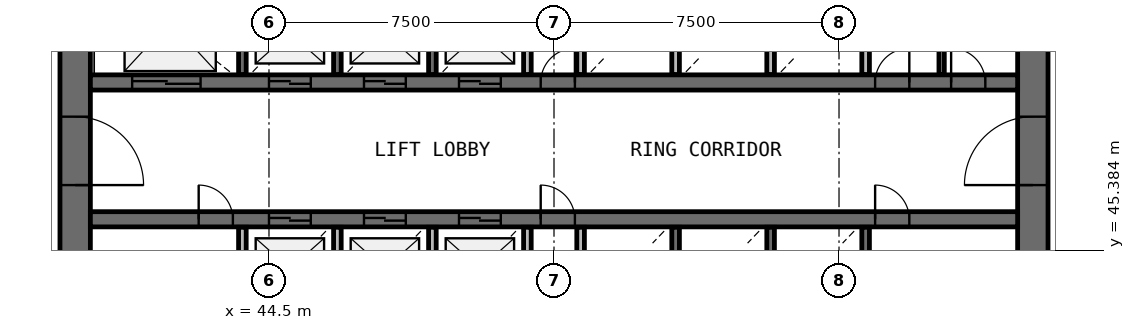
"""IFC4 building model, lengths in metres.
Left out: names, types, materials, properties, quantities, classifications, styles, units other than length and angle.
Written with IfcOpenShell. Run it as: python <this file> out.ifc"""

import sys

from ifc_helpers import new_model, si_unit, direction, frame, frame_2d, origin, place, context, subcontext, project, spatial, rectangle, extrude, source, transform, mapped, element, fill, save


model = new_model("IFC4")
c1 = context("Model", 3, precision=1e-05, world=origin(), true_north=direction((0.0, 1.0)))
c2 = subcontext(c1, "Body", "Model", "MODEL_VIEW")
j1 = project(units=[si_unit("LENGTHUNIT", "METRE"), si_unit("PLANEANGLEUNIT", "RADIAN")], contexts=[c1])
p1 = place(None, origin())
s1 = spatial("IfcSite", under=j1, at=p1, CompositionType="ELEMENT")
p2 = place(p1, origin())
s2 = spatial("IfcBuilding", under=s1, at=p2, CompositionType="ELEMENT")
p3 = place(p2, frame((0.0, 0.0, 92.1)))
s3 = spatial("IfcBuildingStorey", under=s2, at=p3, CompositionType="ELEMENT", Elevation=92.1)
p4 = place(p3, frame((64.6, 38.0, 0.0), z_axis=(0.0, 0.0, 1.0), x_axis=(0.0, 1.0, 0.0)))
e1 = element("IfcWall", 1, at=p4, inside=s3, PredefinedType="SHEAR", context=c2, shape_type="SweptSolid", body=[
    extrude(rectangle(XDim=20.0, YDim=0.8, at=frame_2d((10.0, 0.0))), origin(), (0.0, 0.0, 1.0), 4.1),
])
p5 = place(p4, frame((9.1, 0.0, 0.0)))
e2 = element("IfcOpeningElement", 2, at=p5, cuts=e1, PredefinedType="OPENING", context=c2, shape_type="SweptSolid", body=[
    extrude(rectangle(XDim=1.8, YDim=2.1, at=frame_2d((0.9, 1.05))), frame((0.0, 0.41, 0.0), z_axis=(0.0, -1.0, 0.0), x_axis=(1.0, 0.0, 0.0)), (0.0, 0.0, 1.0), 0.82),
])
p6 = place(p3, frame((39.4, 58.0, 0.0), z_axis=(0.0, 0.0, 1.0), x_axis=(0.0, -1.0, 0.0)))
e3 = element("IfcWall", 3, at=p6, inside=s3, PredefinedType="SHEAR", context=c2, shape_type="SweptSolid", body=[
    extrude(rectangle(XDim=20.0, YDim=0.8, at=frame_2d((10.0, 0.0))), origin(), (0.0, 0.0, 1.0), 4.1),
])
p7 = place(p6, frame((9.1, 0.0, 0.0)))
e4 = element("IfcOpeningElement", 4, at=p7, cuts=e3, PredefinedType="OPENING", context=c2, shape_type="SweptSolid", body=[
    extrude(rectangle(XDim=1.8, YDim=2.1, at=frame_2d((0.9, 1.05))), frame((0.0, 0.41, 0.0), z_axis=(0.0, -1.0, 0.0), x_axis=(1.0, 0.0, 0.0)), (0.0, 0.0, 1.0), 0.82),
])
p8 = place(p3, frame((39.8, 49.8, 0.0), z_axis=(0.0, 0.0, 1.0), x_axis=(1.0, 0.0, 0.0)))
e5 = element("IfcWall", 5, at=p8, inside=s3, PredefinedType="SHEAR", context=c2, shape_type="SweptSolid", body=[
    extrude(rectangle(XDim=24.4, YDim=0.4, at=frame_2d((12.2, 0.0))), origin(), (0.0, 0.0, 1.0), 4.1),
])
p9 = place(p8, frame((4.7, 0.0, 0.0)))
e6 = element("IfcOpeningElement", 6, at=p9, cuts=e5, PredefinedType="OPENING", context=c2, shape_type="SweptSolid", body=[
    extrude(rectangle(XDim=1.1, YDim=2.1, at=frame_2d((0.55, 1.05))), frame((0.0, 0.21, 0.0), z_axis=(0.0, -1.0, 0.0), x_axis=(1.0, 0.0, 0.0)), (0.0, 0.0, 1.0), 0.42),
])
p10 = place(p8, frame((7.2, 0.0, 0.0)))
e7 = element("IfcOpeningElement", 7, at=p10, cuts=e5, PredefinedType="OPENING", context=c2, shape_type="SweptSolid", body=[
    extrude(rectangle(XDim=1.1, YDim=2.1, at=frame_2d((0.55, 1.05))), frame((0.0, 0.21, 0.0), z_axis=(0.0, -1.0, 0.0), x_axis=(1.0, 0.0, 0.0)), (0.0, 0.0, 1.0), 0.42),
])
p11 = place(p8, frame((9.7, 0.0, 0.0)))
e8 = element("IfcOpeningElement", 8, at=p11, cuts=e5, PredefinedType="OPENING", context=c2, shape_type="SweptSolid", body=[
    extrude(rectangle(XDim=1.1, YDim=2.1, at=frame_2d((0.55, 1.05))), frame((0.0, 0.21, 0.0), z_axis=(0.0, -1.0, 0.0), x_axis=(1.0, 0.0, 0.0)), (0.0, 0.0, 1.0), 0.42),
])
p12 = place(p8, frame((1.1, 0.0, 0.0)))
e9 = element("IfcOpeningElement", 9, at=p12, cuts=e5, PredefinedType="OPENING", context=c2, shape_type="SweptSolid", body=[
    extrude(rectangle(XDim=1.8, YDim=2.4, at=frame_2d((0.9, 1.2))), frame((0.0, 0.21, 0.0), z_axis=(0.0, -1.0, 0.0), x_axis=(1.0, 0.0, 0.0)), (0.0, 0.0, 1.0), 0.42),
])
p13 = place(p8, frame((20.65, 0.0, 0.0)))
e10 = element("IfcOpeningElement", 10, at=p13, cuts=e5, PredefinedType="OPENING", context=c2, shape_type="SweptSolid", body=[
    extrude(rectangle(XDim=0.9, YDim=2.1, at=frame_2d((0.45, 1.05))), frame((0.0, 0.21, 0.0), z_axis=(0.0, -1.0, 0.0), x_axis=(1.0, 0.0, 0.0)), (0.0, 0.0, 1.0), 0.42),
])
p14 = place(p8, frame((22.65, 0.0, 0.0)))
e11 = element("IfcOpeningElement", 11, at=p14, cuts=e5, PredefinedType="OPENING", context=c2, shape_type="SweptSolid", body=[
    extrude(rectangle(XDim=0.9, YDim=2.1, at=frame_2d((0.45, 1.05))), frame((0.0, 0.21, 0.0), z_axis=(0.0, -1.0, 0.0), x_axis=(1.0, 0.0, 0.0)), (0.0, 0.0, 1.0), 0.42),
])
p15 = place(p8, frame((11.85, 0.0, 0.0)))
e12 = element("IfcOpeningElement", 12, at=p15, cuts=e5, PredefinedType="OPENING", context=c2, shape_type="SweptSolid", body=[
    extrude(rectangle(XDim=0.9, YDim=2.1, at=frame_2d((0.45, 1.05))), frame((0.0, 0.21, 0.0), z_axis=(0.0, -1.0, 0.0), x_axis=(1.0, 0.0, 0.0)), (0.0, 0.0, 1.0), 0.42),
])
p16 = place(p3, frame((39.8, 46.2, 0.0), z_axis=(0.0, 0.0, 1.0), x_axis=(1.0, 0.0, 0.0)))
e13 = element("IfcWall", 13, at=p16, inside=s3, PredefinedType="SHEAR", context=c2, shape_type="SweptSolid", body=[
    extrude(rectangle(XDim=24.4, YDim=0.4, at=frame_2d((12.2, 0.0))), origin(), (0.0, 0.0, 1.0), 4.1),
])
p17 = place(p16, frame((4.7, 0.0, 0.0)))
e14 = element("IfcOpeningElement", 14, at=p17, cuts=e13, PredefinedType="OPENING", context=c2, shape_type="SweptSolid", body=[
    extrude(rectangle(XDim=1.1, YDim=2.1, at=frame_2d((0.55, 1.05))), frame((0.0, 0.21, 0.0), z_axis=(0.0, -1.0, 0.0), x_axis=(1.0, 0.0, 0.0)), (0.0, 0.0, 1.0), 0.42),
])
p18 = place(p16, frame((7.2, 0.0, 0.0)))
e15 = element("IfcOpeningElement", 15, at=p18, cuts=e13, PredefinedType="OPENING", context=c2, shape_type="SweptSolid", body=[
    extrude(rectangle(XDim=1.1, YDim=2.1, at=frame_2d((0.55, 1.05))), frame((0.0, 0.21, 0.0), z_axis=(0.0, -1.0, 0.0), x_axis=(1.0, 0.0, 0.0)), (0.0, 0.0, 1.0), 0.42),
])
p19 = place(p16, frame((9.7, 0.0, 0.0)))
e16 = element("IfcOpeningElement", 16, at=p19, cuts=e13, PredefinedType="OPENING", context=c2, shape_type="SweptSolid", body=[
    extrude(rectangle(XDim=1.1, YDim=2.1, at=frame_2d((0.55, 1.05))), frame((0.0, 0.21, 0.0), z_axis=(0.0, -1.0, 0.0), x_axis=(1.0, 0.0, 0.0)), (0.0, 0.0, 1.0), 0.42),
])
p20 = place(p16, frame((20.65, 0.0, 0.0)))
e17 = element("IfcOpeningElement", 17, at=p20, cuts=e13, PredefinedType="OPENING", context=c2, shape_type="SweptSolid", body=[
    extrude(rectangle(XDim=0.9, YDim=2.1, at=frame_2d((0.45, 1.05))), frame((0.0, 0.21, 0.0), z_axis=(0.0, -1.0, 0.0), x_axis=(1.0, 0.0, 0.0)), (0.0, 0.0, 1.0), 0.42),
])
p21 = place(p16, frame((2.85, 0.0, 0.0)))
e18 = element("IfcOpeningElement", 18, at=p21, cuts=e13, PredefinedType="OPENING", context=c2, shape_type="SweptSolid", body=[
    extrude(rectangle(XDim=0.9, YDim=2.1, at=frame_2d((0.45, 1.05))), frame((0.0, 0.21, 0.0), z_axis=(0.0, -1.0, 0.0), x_axis=(1.0, 0.0, 0.0)), (0.0, 0.0, 1.0), 0.42),
])
p22 = place(p16, frame((11.85, 0.0, 0.0)))
e19 = element("IfcOpeningElement", 19, at=p22, cuts=e13, PredefinedType="OPENING", context=c2, shape_type="SweptSolid", body=[
    extrude(rectangle(XDim=0.9, YDim=2.1, at=frame_2d((0.45, 1.05))), frame((0.0, 0.21, 0.0), z_axis=(0.0, -1.0, 0.0), x_axis=(1.0, 0.0, 0.0)), (0.0, 0.0, 1.0), 0.42),
])
for number, where, z_axis, x_axis in (
    (20, (43.8, 45.99, 0.0), (0.0, 0.0, 1.0), (0.0, -1.0, 0.0)),
    (21, (43.8, 52.37, 0.0), (0.0, 0.0, 1.0), (0.0, -1.0, 0.0)),
):
    element("IfcWall", number, at=place(p3, frame(where, z_axis=z_axis, x_axis=x_axis)), inside=s3, PredefinedType="SOLIDWALL", context=c2, shape_type="SweptSolid", body=[
        extrude(rectangle(XDim=2.36, YDim=0.2, at=frame_2d((1.18, 0.0))), origin(), (0.0, 0.0, 1.0), 3.7),
    ])
p23 = place(p3, frame((46.3, 43.6, 0.0), z_axis=(0.0, 0.0, 1.0), x_axis=(0.0, 1.0, 0.0)))
e22 = element("IfcWall", 22, at=p23, inside=s3, PredefinedType="SOLIDWALL", context=c2, shape_type="SweptSolid", body=[
    extrude(rectangle(XDim=2.39, YDim=0.2, at=frame_2d((1.195, 0.0))), origin(), (0.0, 0.0, 1.0), 3.7),
])
for number, where, z_axis, x_axis in (
    (23, (46.3, 50.01, 0.0), (0.0, 0.0, 1.0), (0.0, 1.0, 0.0)),
    (24, (48.8, 43.63, 0.0), (0.0, 0.0, 1.0), (0.0, 1.0, 0.0)),
    (25, (48.8, 50.01, 0.0), (0.0, 0.0, 1.0), (0.0, 1.0, 0.0)),
    (26, (51.3, 43.63, 0.0), (0.0, 0.0, 1.0), (0.0, 1.0, 0.0)),
):
    element("IfcWall", number, at=place(p3, frame(where, z_axis=z_axis, x_axis=x_axis)), inside=s3, PredefinedType="SOLIDWALL", context=c2, shape_type="SweptSolid", body=[
        extrude(rectangle(XDim=2.36, YDim=0.2, at=frame_2d((1.18, 0.0))), origin(), (0.0, 0.0, 1.0), 3.7),
    ])
for number, where, z_axis, x_axis in (
    (27, (51.3, 50.01, 0.0), (0.0, 0.0, 1.0), (0.0, 1.0, 0.0)),
    (28, (52.7, 45.99, 0.0), (0.0, 0.0, 1.0), (0.0, -1.0, 0.0)),
):
    element("IfcWall", number, at=place(p3, frame(where, z_axis=z_axis, x_axis=x_axis)), inside=s3, PredefinedType="SOLIDWALL", context=c2, shape_type="SweptSolid", body=[
        extrude(rectangle(XDim=2.39, YDim=0.2, at=frame_2d((1.195, 0.0))), origin(), (0.0, 0.0, 1.0), 3.7),
    ])
for number, where, z_axis, x_axis in (
    (29, (52.7, 52.37, 0.0), (0.0, 0.0, 1.0), (0.0, -1.0, 0.0)),
    (30, (55.2, 43.63, 0.0), (0.0, 0.0, 1.0), (0.0, 1.0, 0.0)),
    (31, (55.2, 50.01, 0.0), (0.0, 0.0, 1.0), (0.0, 1.0, 0.0)),
    (32, (57.7, 43.63, 0.0), (0.0, 0.0, 1.0), (0.0, 1.0, 0.0)),
):
    element("IfcWall", number, at=place(p3, frame(where, z_axis=z_axis, x_axis=x_axis)), inside=s3, PredefinedType="SOLIDWALL", context=c2, shape_type="SweptSolid", body=[
        extrude(rectangle(XDim=2.36, YDim=0.2, at=frame_2d((1.18, 0.0))), origin(), (0.0, 0.0, 1.0), 3.7),
    ])
p24 = place(p3, frame((57.7, 50.01, 0.0), z_axis=(0.0, 0.0, 1.0), x_axis=(0.0, 1.0, 0.0)))
e33 = element("IfcWall", 33, at=p24, inside=s3, PredefinedType="SOLIDWALL", context=c2, shape_type="SweptSolid", body=[
    extrude(rectangle(XDim=2.39, YDim=0.2, at=frame_2d((1.195, 0.0))), origin(), (0.0, 0.0, 1.0), 3.7),
])
for number, where, z_axis, x_axis in (
    (34, (60.2, 43.63, 0.0), (0.0, 0.0, 1.0), (0.0, 1.0, 0.0)),
    (35, (60.2, 50.01, 0.0), (0.0, 0.0, 1.0), (0.0, 1.0, 0.0)),
):
    element("IfcWall", number, at=place(p3, frame(where, z_axis=z_axis, x_axis=x_axis)), inside=s3, PredefinedType="SOLIDWALL", context=c2, shape_type="SweptSolid", body=[
        extrude(rectangle(XDim=2.36, YDim=0.2, at=frame_2d((1.18, 0.0))), origin(), (0.0, 0.0, 1.0), 3.7),
    ])
p25 = place(p3, frame((62.2, 50.01, 0.0), z_axis=(0.0, 0.0, 1.0), x_axis=(0.0, 1.0, 0.0)))
e36 = element("IfcWall", 36, at=p25, inside=s3, PredefinedType="PARTITIONING", context=c2, shape_type="SweptSolid", body=[
    extrude(rectangle(XDim=2.39, YDim=0.14, at=frame_2d((1.195, 0.0))), origin(), (0.0, 0.0, 1.0), 2.9),
])
m1 = source(origin(), c2, "Body", "SweptSolid", [
    extrude(rectangle(XDim=1.8, YDim=2.1, at=frame_2d((0.9, 1.05))), frame((0.0, 0.025, 0.0), z_axis=(0.0, -1.0, 0.0), x_axis=(1.0, 0.0, 0.0)), (0.0, 0.0, 1.0), 0.05),
])
p26 = place(p7, origin())
e37 = element("IfcDoor", 37, at=p26, inside=s3, OperationType="SINGLE_SWING_RIGHT", PredefinedType="DOOR", context=c2, shape_type="MappedRepresentation", body=[
    mapped(m1, transform((0.0, 0.0, 0.0), scale=1.0)),
])
fill(e4, e37)
p27 = place(p5, origin())
e38 = element("IfcDoor", 38, at=p27, inside=s3, OperationType="SINGLE_SWING_LEFT", PredefinedType="DOOR", context=c2, shape_type="MappedRepresentation", body=[
    mapped(m1, transform((0.0, 0.0, 0.0), scale=1.0)),
])
fill(e2, e38)
m2 = source(origin(), c2, "Body", "SweptSolid", [
    extrude(rectangle(XDim=1.1, YDim=2.1, at=frame_2d((0.55, 1.05))), frame((0.0, 0.025, 0.0), z_axis=(0.0, -1.0, 0.0), x_axis=(1.0, 0.0, 0.0)), (0.0, 0.0, 1.0), 0.05),
])
p28 = place(p9, origin())
e39 = element("IfcDoor", 39, at=p28, inside=s3, OperationType="DOUBLE_DOOR_SLIDING", PredefinedType="USERDEFINED", context=c2, shape_type="MappedRepresentation", body=[
    mapped(m2, transform((0.0, 0.0, 0.0), scale=1.0)),
])
fill(e6, e39)
p29 = place(p10, origin())
e40 = element("IfcDoor", 40, at=p29, inside=s3, OperationType="DOUBLE_DOOR_SLIDING", PredefinedType="USERDEFINED", context=c2, shape_type="MappedRepresentation", body=[
    mapped(m2, transform((0.0, 0.0, 0.0), scale=1.0)),
])
fill(e7, e40)
p30 = place(p11, origin())
e41 = element("IfcDoor", 41, at=p30, inside=s3, OperationType="DOUBLE_DOOR_SLIDING", PredefinedType="USERDEFINED", context=c2, shape_type="MappedRepresentation", body=[
    mapped(m2, transform((0.0, 0.0, 0.0), scale=1.0)),
])
fill(e8, e41)
p31 = place(p17, origin())
e42 = element("IfcDoor", 42, at=p31, inside=s3, OperationType="DOUBLE_DOOR_SLIDING", PredefinedType="USERDEFINED", context=c2, shape_type="MappedRepresentation", body=[
    mapped(m2, transform((0.0, 0.0, 0.0), scale=1.0)),
])
fill(e14, e42)
p32 = place(p18, origin())
e43 = element("IfcDoor", 43, at=p32, inside=s3, OperationType="DOUBLE_DOOR_SLIDING", PredefinedType="USERDEFINED", context=c2, shape_type="MappedRepresentation", body=[
    mapped(m2, transform((0.0, 0.0, 0.0), scale=1.0)),
])
fill(e15, e43)
p33 = place(p19, origin())
e44 = element("IfcDoor", 44, at=p33, inside=s3, OperationType="DOUBLE_DOOR_SLIDING", PredefinedType="USERDEFINED", context=c2, shape_type="MappedRepresentation", body=[
    mapped(m2, transform((0.0, 0.0, 0.0), scale=1.0)),
])
fill(e16, e44)
m3 = source(origin(), c2, "Body", "SweptSolid", [
    extrude(rectangle(XDim=1.8, YDim=2.4, at=frame_2d((0.9, 1.2))), frame((0.0, 0.025, 0.0), z_axis=(0.0, -1.0, 0.0), x_axis=(1.0, 0.0, 0.0)), (0.0, 0.0, 1.0), 0.05),
])
p34 = place(p12, origin())
e45 = element("IfcDoor", 45, at=p34, inside=s3, OperationType="DOUBLE_DOOR_SLIDING", PredefinedType="USERDEFINED", context=c2, shape_type="MappedRepresentation", body=[
    mapped(m3, transform((0.0, 0.0, 0.0), scale=1.0)),
])
fill(e9, e45)
m4 = source(origin(), c2, "Body", "SweptSolid", [
    extrude(rectangle(XDim=0.9, YDim=2.1, at=frame_2d((0.45, 1.05))), frame((0.0, 0.025, 0.0), z_axis=(0.0, -1.0, 0.0), x_axis=(1.0, 0.0, 0.0)), (0.0, 0.0, 1.0), 0.05),
])
p35 = place(p20, origin())
e46 = element("IfcDoor", 46, at=p35, inside=s3, OperationType="SINGLE_SWING_LEFT", PredefinedType="DOOR", context=c2, shape_type="MappedRepresentation", body=[
    mapped(m4, transform((0.0, 0.0, 0.0), scale=1.0)),
])
fill(e17, e46)
p36 = place(p13, origin())
e47 = element("IfcDoor", 47, at=p36, inside=s3, OperationType="SINGLE_SWING_RIGHT", PredefinedType="DOOR", context=c2, shape_type="MappedRepresentation", body=[
    mapped(m4, transform((0.0, 0.0, 0.0), scale=1.0)),
])
fill(e10, e47)
p37 = place(p14, origin())
e48 = element("IfcDoor", 48, at=p37, inside=s3, OperationType="SINGLE_SWING_LEFT", PredefinedType="DOOR", context=c2, shape_type="MappedRepresentation", body=[
    mapped(m4, transform((0.0, 0.0, 0.0), scale=1.0)),
])
fill(e11, e48)
p38 = place(p21, origin())
e49 = element("IfcDoor", 49, at=p38, inside=s3, OperationType="SINGLE_SWING_LEFT", PredefinedType="DOOR", context=c2, shape_type="MappedRepresentation", body=[
    mapped(m4, transform((0.0, 0.0, 0.0), scale=1.0)),
])
fill(e18, e49)
p39 = place(p15, origin())
e50 = element("IfcDoor", 50, at=p39, inside=s3, OperationType="SINGLE_SWING_RIGHT", PredefinedType="DOOR", context=c2, shape_type="MappedRepresentation", body=[
    mapped(m4, transform((0.0, 0.0, 0.0), scale=1.0)),
])
fill(e12, e50)
p40 = place(p22, origin())
e51 = element("IfcDoor", 51, at=p40, inside=s3, OperationType="SINGLE_SWING_LEFT", PredefinedType="DOOR", context=c2, shape_type="MappedRepresentation", body=[
    mapped(m4, transform((0.0, 0.0, 0.0), scale=1.0)),
])
fill(e19, e51)
save(model, sys.argv[1])
